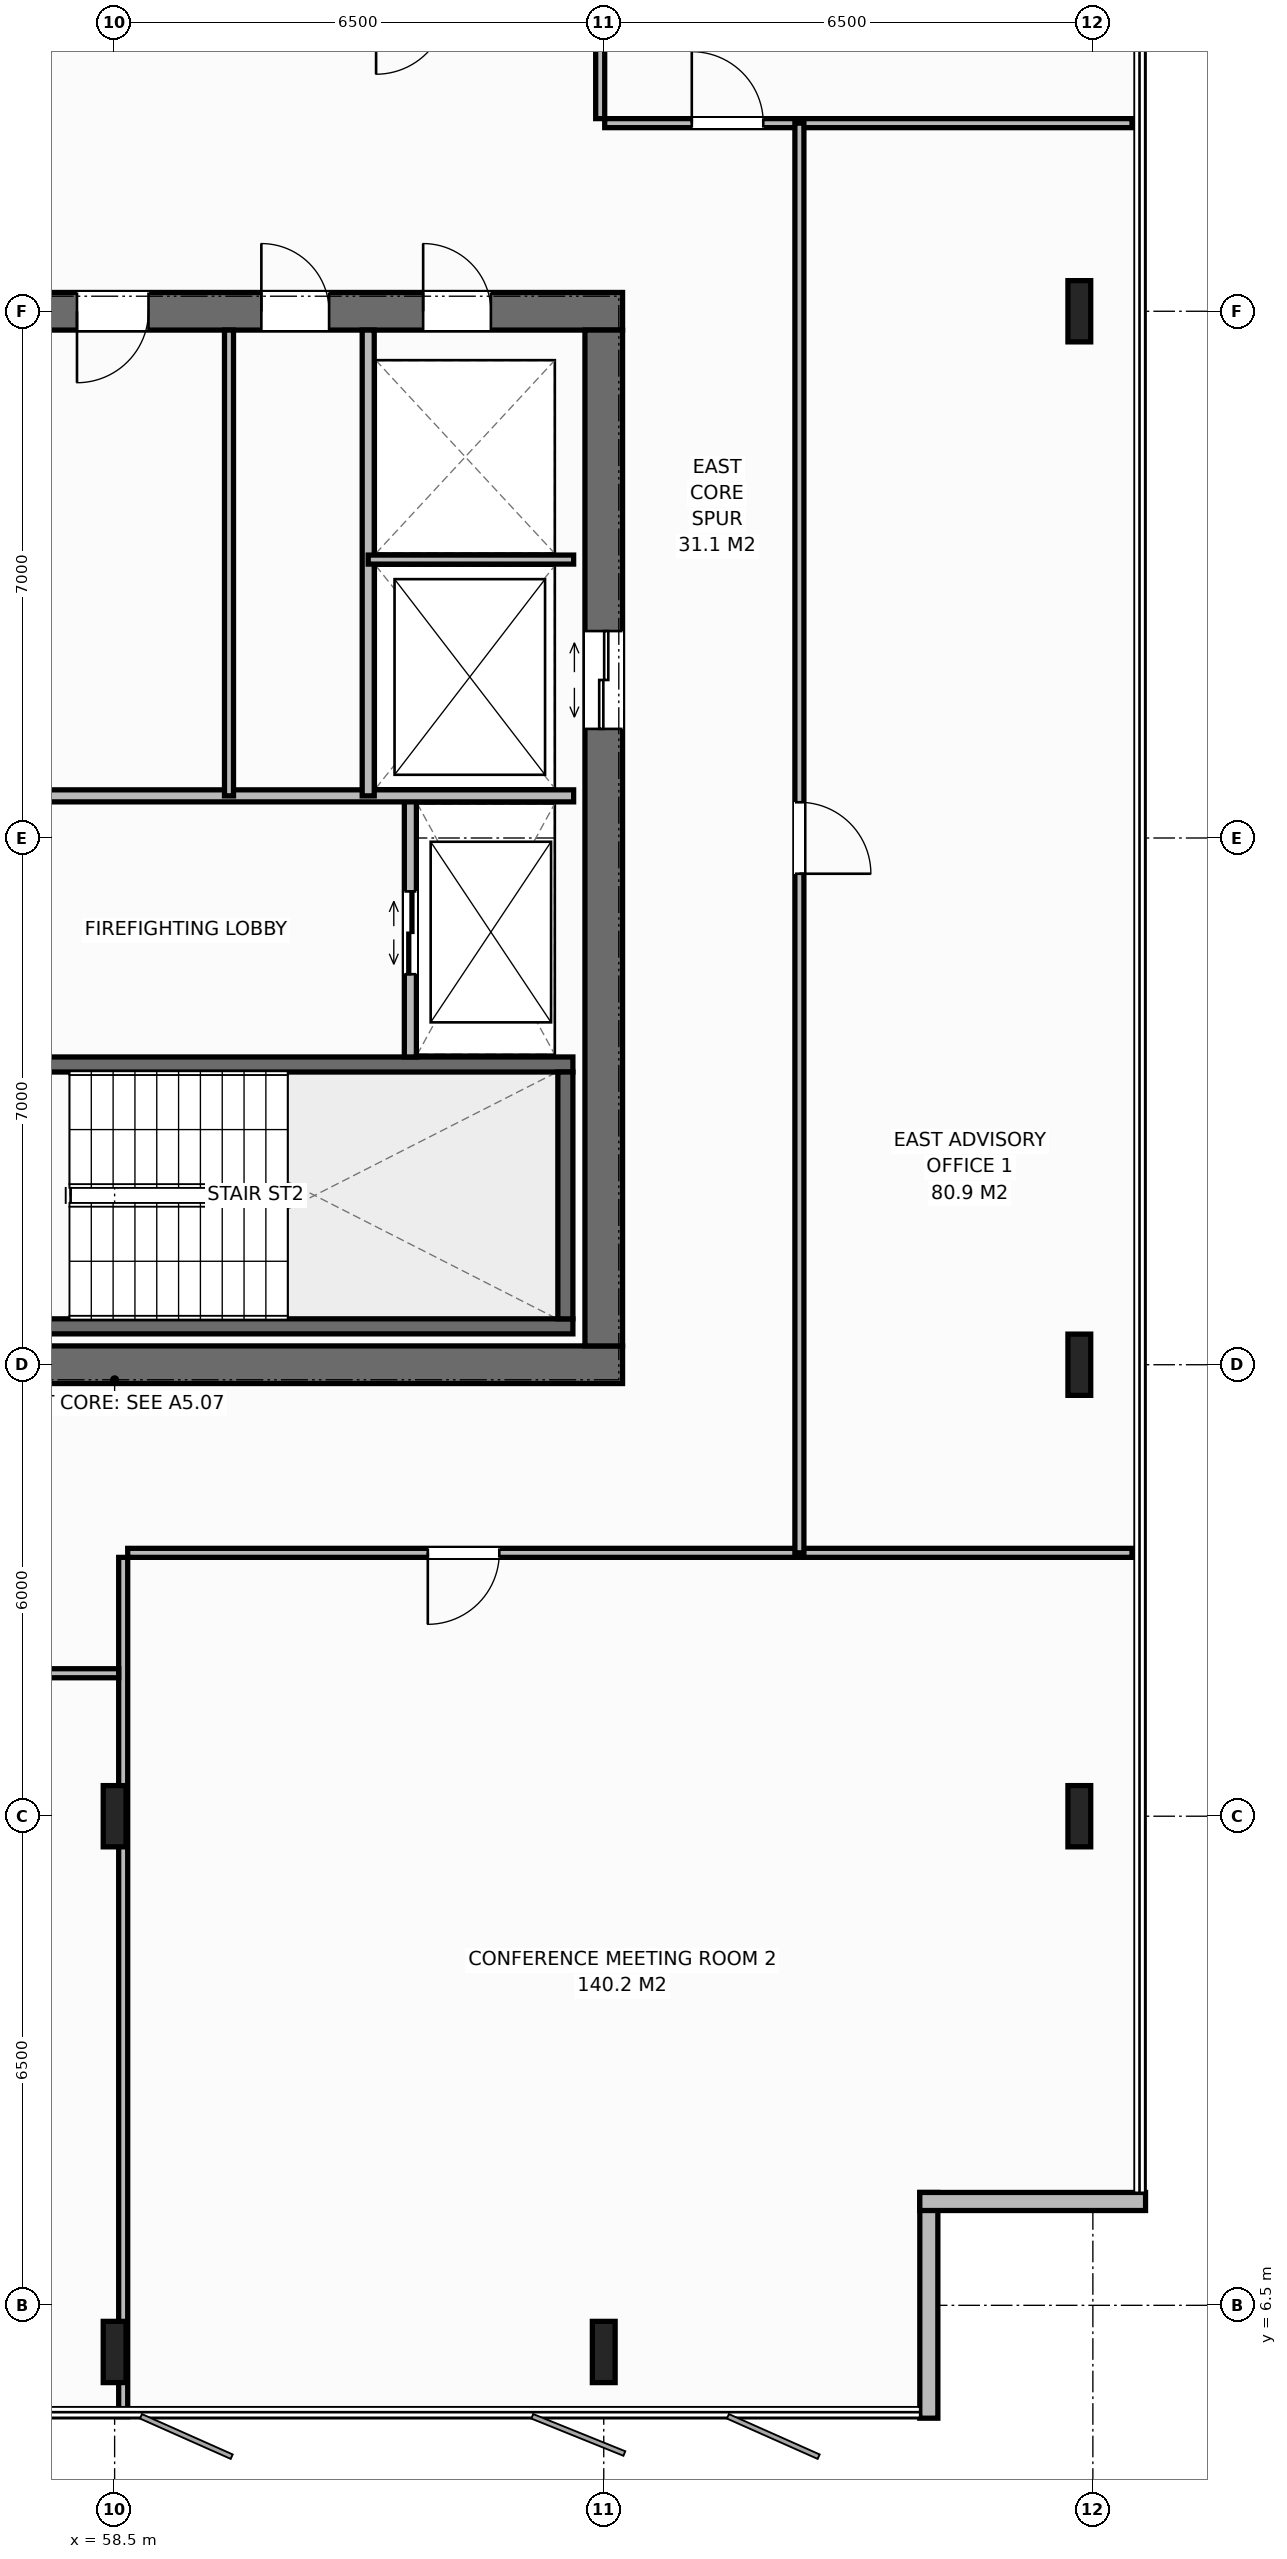
"""IFC4 building model, lengths in metres.
Left out: names, types, materials, properties, quantities, classifications, styles, units other than length and angle.
Written with IfcOpenShell. Run it as: python <this file> out.ifc"""

import sys

from ifc_helpers import new_model, si_unit, direction, frame, frame_2d, origin, origin_2d, place, context, subcontext, project, spatial, rectangle, i_section, extrude, element, fill, save


model = new_model("IFC4")
c1 = context("Model", 3, precision=1e-05, world=origin(), true_north=direction((0.0, 1.0)))
c2 = subcontext(c1, "Body", "Model", "MODEL_VIEW")
j1 = project(units=[si_unit("LENGTHUNIT", "METRE"), si_unit("PLANEANGLEUNIT", "RADIAN")], contexts=[c1])
p1 = place(None, origin())
s1 = spatial("IfcSite", under=j1, at=p1, CompositionType="ELEMENT")
p2 = place(p1, origin())
s2 = spatial("IfcBuilding", under=s1, at=p2, CompositionType="ELEMENT")
p3 = place(p2, frame((0.0, 0.0, 229.0)))
s3 = spatial("IfcBuildingStorey", under=s2, at=p3, CompositionType="ELEMENT", Elevation=229.0)
p4 = place(p3, frame((51.75, 19.0, 0.0), z_axis=(0.0, 0.0, 1.0), x_axis=(1.0, 0.0, 0.0)))
e1 = element("IfcWall", 1, at=p4, inside=s3, PredefinedType="SHEAR", context=c2, shape_type="SweptSolid", body=[
    extrude(rectangle(XDim=13.5, YDim=0.5, at=frame_2d((6.75, 0.0))), origin(), (0.0, 0.0, 1.0), 3.8),
])
p5 = place(p4, frame((2.97, 0.0, 0.0)))
e2 = element("IfcOpeningElement", 2, at=p5, cuts=e1, PredefinedType="OPENING", context=c2, shape_type="SweptSolid", body=[
    extrude(rectangle(XDim=1.4, YDim=2.2, at=frame_2d((0.7, 1.1))), frame((0.0, 0.26, 0.0), z_axis=(0.0, -1.0, 0.0), x_axis=(1.0, 0.0, 0.0)), (0.0, 0.0, 1.0), 0.52),
])
p6 = place(p3, frame((51.75, 33.0, 0.0), z_axis=(0.0, 0.0, 1.0), x_axis=(1.0, 0.0, 0.0)))
e3 = element("IfcWall", 3, at=p6, inside=s3, PredefinedType="SHEAR", context=c2, shape_type="SweptSolid", body=[
    extrude(rectangle(XDim=13.5, YDim=0.5, at=frame_2d((6.75, 0.0))), origin(), (0.0, 0.0, 1.0), 3.8),
])
p7 = place(p6, frame((2.97, 0.0, 0.0)))
e4 = element("IfcOpeningElement", 4, at=p7, cuts=e3, PredefinedType="OPENING", context=c2, shape_type="SweptSolid", body=[
    extrude(rectangle(XDim=1.4, YDim=2.2, at=frame_2d((0.7, 1.1))), frame((0.0, 0.26, 0.0), z_axis=(0.0, -1.0, 0.0), x_axis=(1.0, 0.0, 0.0)), (0.0, 0.0, 1.0), 0.52),
])
p8 = place(p6, frame((10.85, 0.0, 0.0)))
e5 = element("IfcOpeningElement", 5, at=p8, cuts=e3, PredefinedType="OPENING", context=c2, shape_type="SweptSolid", body=[
    extrude(rectangle(XDim=0.9, YDim=2.15, at=frame_2d((0.45, 1.075))), frame((0.0, 0.26, 0.0), z_axis=(0.0, -1.0, 0.0), x_axis=(1.0, 0.0, 0.0)), (0.0, 0.0, 1.0), 0.52),
])
p9 = place(p6, frame((6.25, 0.0, 0.0)))
e6 = element("IfcOpeningElement", 6, at=p9, cuts=e3, PredefinedType="OPENING", context=c2, shape_type="SweptSolid", body=[
    extrude(rectangle(XDim=0.95, YDim=2.15, at=frame_2d((0.475, 1.075))), frame((0.0, 0.26, 0.0), z_axis=(0.0, -1.0, 0.0), x_axis=(1.0, 0.0, 0.0)), (0.0, 0.0, 1.0), 0.52),
])
p10 = place(p6, frame((8.7, 0.0, 0.0)))
e7 = element("IfcOpeningElement", 7, at=p10, cuts=e3, PredefinedType="OPENING", context=c2, shape_type="SweptSolid", body=[
    extrude(rectangle(XDim=0.9, YDim=2.15, at=frame_2d((0.45, 1.075))), frame((0.0, 0.26, 0.0), z_axis=(0.0, -1.0, 0.0), x_axis=(1.0, 0.0, 0.0)), (0.0, 0.0, 1.0), 0.52),
])
p11 = place(p3, frame((65.0, 19.25, 0.0), z_axis=(0.0, 0.0, 1.0), x_axis=(0.0, 1.0, 0.0)))
e8 = element("IfcWall", 8, at=p11, inside=s3, PredefinedType="SHEAR", context=c2, shape_type="SweptSolid", body=[
    extrude(rectangle(XDim=13.5, YDim=0.5, at=frame_2d((6.75, 0.0))), origin(), (0.0, 0.0, 1.0), 3.8),
])
p12 = place(p11, frame((8.2, 0.0, 0.0)))
e9 = element("IfcOpeningElement", 9, at=p12, cuts=e8, PredefinedType="OPENING", context=c2, shape_type="SweptSolid", body=[
    extrude(rectangle(XDim=1.3, YDim=2.2, at=frame_2d((0.65, 1.1))), frame((0.0, 0.26, 0.0), z_axis=(0.0, -1.0, 0.0), x_axis=(1.0, 0.0, 0.0)), (0.0, 0.0, 1.0), 0.52),
])
p13 = place(p3, frame((56.16, 19.51, 0.0), z_axis=(0.0, 0.0, 1.0), x_axis=(1.0, 0.0, 0.0)))
e10 = element("IfcWall", 10, at=p13, inside=s3, PredefinedType="SHEAR", context=c2, shape_type="SweptSolid", body=[
    extrude(rectangle(XDim=8.43, YDim=0.2, at=frame_2d((4.215, 0.0))), origin(), (0.0, 0.0, 1.0), 3.8),
])
p14 = place(p3, frame((56.16, 22.99, 0.0), z_axis=(0.0, 0.0, 1.0), x_axis=(1.0, 0.0, 0.0)))
e11 = element("IfcWall", 11, at=p14, inside=s3, PredefinedType="SHEAR", context=c2, shape_type="SweptSolid", body=[
    extrude(rectangle(XDim=8.43, YDim=0.2, at=frame_2d((4.215, 0.0))), origin(), (0.0, 0.0, 1.0), 3.8),
])
p15 = place(p14, frame((0.45, 0.0, 0.0)))
e12 = element("IfcOpeningElement", 12, at=p15, cuts=e11, PredefinedType="OPENING", context=c2, shape_type="SweptSolid", body=[
    extrude(rectangle(XDim=1.0, YDim=2.15, at=frame_2d((0.5, 1.075))), frame((0.0, 0.11, 0.0), z_axis=(0.0, -1.0, 0.0), x_axis=(1.0, 0.0, 0.0)), (0.0, 0.0, 1.0), 0.22),
])
p16 = place(p3, frame((64.49, 19.61, 0.0), z_axis=(0.0, 0.0, 1.0), x_axis=(0.0, 1.0, 0.0)))
e13 = element("IfcWall", 13, at=p16, inside=s3, PredefinedType="SHEAR", context=c2, shape_type="SweptSolid", body=[
    extrude(rectangle(XDim=3.28, YDim=0.2, at=frame_2d((1.64, 0.0))), origin(), (0.0, 0.0, 1.0), 3.8),
])
for number, where, z_axis, x_axis in (
    (14, (58.5, 13.0, 0.0), (0.0, 0.0, 1.0), (1.0, 0.0, 0.0)),
    (15, (58.5, 5.88, 0.0), (0.0, 0.0, 1.0), (1.0, 0.0, 0.0)),
    (16, (65.0, 5.88, 0.0), (0.0, 0.0, 1.0), (1.0, 0.0, 0.0)),
    (17, (71.32, 13.0, 0.0), (0.0, 0.0, 1.0), (1.0, 0.0, 0.0)),
    (18, (71.32, 19.0, 0.0), (0.0, 0.0, 1.0), (1.0, 0.0, 0.0)),
    (19, (71.32, 33.0, 0.0), (0.0, 0.0, 1.0), (1.0, 0.0, 0.0)),
):
    element("IfcColumn", number, at=place(p3, frame(where, z_axis=z_axis, x_axis=x_axis)), inside=s3, PredefinedType="COLUMN", context=c2, shape_type="SweptSolid", body=[
        extrude(i_section(OverallWidth=0.303, OverallDepth=0.814, WebThickness=0.021, FlangeThickness=0.04, at=origin_2d()), origin(), (0.0, 0.0, 1.0), 3.8),
    ])
for number, where, z_axis, x_axis in (
    (20, (69.32, 8.0, 0.0), (0.0, 0.0, 1.0), (0.0, -1.0, 0.0)),
    (21, (72.2, 7.88, 0.0), (0.0, 0.0, 1.0), (-1.0, 0.0, 0.0)),
):
    element("IfcWall", number, at=place(p3, frame(where, z_axis=z_axis, x_axis=x_axis)), inside=s3, PredefinedType="STANDARD", context=c2, shape_type="SweptSolid", body=[
        extrude(rectangle(XDim=3.0, YDim=0.24, at=frame_2d((1.5, 0.0))), origin(), (0.0, 0.0, 1.0), 3.58),
    ])
p17 = place(p3, frame((62.43, 23.09, 0.0), z_axis=(0.0, 0.0, 1.0), x_axis=(0.0, 1.0, 0.0)))
e22 = element("IfcWall", 22, at=p17, inside=s3, PredefinedType="STANDARD", context=c2, shape_type="SweptSolid", body=[
    extrude(rectangle(XDim=3.47, YDim=0.16, at=frame_2d((1.735, 0.0))), origin(), (0.0, 0.0, 1.0), 3.58),
])
p18 = place(p17, frame((1.1, 0.0, 0.0)))
e23 = element("IfcOpeningElement", 23, at=p18, cuts=e22, PredefinedType="OPENING", context=c2, shape_type="SweptSolid", body=[
    extrude(rectangle(XDim=1.1, YDim=2.2, at=frame_2d((0.55, 1.1))), frame((0.0, 0.09, 0.0), z_axis=(0.0, -1.0, 0.0), x_axis=(1.0, 0.0, 0.0)), (0.0, 0.0, 1.0), 0.18),
])
p19 = place(p3, frame((56.26, 26.56, 0.0), z_axis=(0.0, 0.0, 1.0), x_axis=(1.0, 0.0, 0.0)))
e24 = element("IfcWall", 24, at=p19, inside=s3, PredefinedType="STANDARD", context=c2, shape_type="SweptSolid", body=[
    extrude(rectangle(XDim=8.34, YDim=0.16, at=frame_2d((4.17, 0.0))), origin(), (0.0, 0.0, 1.0), 3.58),
])
p20 = place(p3, frame((61.87, 26.56, 0.0), z_axis=(0.0, 0.0, 1.0), x_axis=(0.0, 1.0, 0.0)))
e25 = element("IfcWall", 25, at=p20, inside=s3, PredefinedType="STANDARD", context=c2, shape_type="SweptSolid", body=[
    extrude(rectangle(XDim=6.19, YDim=0.16, at=frame_2d((3.095, 0.0))), origin(), (0.0, 0.0, 1.0), 3.58),
])
p21 = place(p3, frame((61.87, 29.7, 0.0), z_axis=(0.0, 0.0, 1.0), x_axis=(1.0, 0.0, 0.0)))
e26 = element("IfcWall", 26, at=p21, inside=s3, PredefinedType="PARTITIONING", context=c2, shape_type="SweptSolid", body=[
    extrude(rectangle(XDim=2.73, YDim=0.12, at=frame_2d((1.365, 0.0))), origin(), (0.0, 0.0, 1.0), 3.58),
])
p22 = place(p3, frame((60.02, 26.56, 0.0), z_axis=(0.0, 0.0, 1.0), x_axis=(0.0, 1.0, 0.0)))
e27 = element("IfcWall", 27, at=p22, inside=s3, PredefinedType="PARTITIONING", context=c2, shape_type="SweptSolid", body=[
    extrude(rectangle(XDim=6.19, YDim=0.12, at=frame_2d((3.095, 0.0))), origin(), (0.0, 0.0, 1.0), 3.58),
])
p23 = place(p3, frame((64.953, 35.56, 0.0), z_axis=(0.0, 0.0, 1.0), x_axis=(0.0, 1.0, 0.0)))
e28 = element("IfcWall", 28, at=p23, inside=s3, PredefinedType="PARTITIONING", context=c2, shape_type="SweptSolid", body=[
    extrude(rectangle(XDim=11.42, YDim=0.12, at=frame_2d((5.71, 0.0))), origin(), (0.0, 0.0, 1.0), 2.88),
])
p24 = place(p3, frame((65.013, 35.5, 0.0), z_axis=(0.0, 0.0, 1.0), x_axis=(1.0, 0.0, 0.0)))
e29 = element("IfcWall", 29, at=p24, inside=s3, PredefinedType="PARTITIONING", context=c2, shape_type="SweptSolid", body=[
    extrude(rectangle(XDim=7.007, YDim=0.12, at=frame_2d((3.504, 0.0))), origin(), (0.0, 0.0, 1.0), 3.58),
])
p25 = place(p24, frame((1.157, 0.0, 0.0)))
e30 = element("IfcOpeningElement", 30, at=p25, cuts=e29, PredefinedType="OPENING", context=c2, shape_type="SweptSolid", body=[
    extrude(rectangle(XDim=0.95, YDim=2.15, at=frame_2d((0.475, 1.075))), frame((0.0, 0.07, 0.0), z_axis=(0.0, -1.0, 0.0), x_axis=(1.0, 0.0, 0.0)), (0.0, 0.0, 1.0), 0.14),
])
p26 = place(p3, frame((58.614, 5.02, 0.0), z_axis=(0.0, 0.0, 1.0), x_axis=(0.0, 1.0, 0.0)))
e31 = element("IfcWall", 31, at=p26, inside=s3, PredefinedType="PARTITIONING", context=c2, shape_type="SweptSolid", body=[
    extrude(rectangle(XDim=11.42, YDim=0.12, at=frame_2d((5.71, 0.0))), origin(), (0.0, 0.0, 1.0), 2.88),
])
p27 = place(p3, frame((46.457, 14.9, 0.0), z_axis=(0.0, 0.0, 1.0), x_axis=(1.0, 0.0, 0.0)))
e32 = element("IfcWall", 32, at=p27, inside=s3, PredefinedType="PARTITIONING", context=c2, shape_type="SweptSolid", body=[
    extrude(rectangle(XDim=12.097, YDim=0.12, at=frame_2d((6.049, 0.0))), origin(), (0.0, 0.0, 1.0), 3.58),
])
p28 = place(p27, frame((0.48, 0.0, 0.0)))
e33 = element("IfcOpeningElement", 33, at=p28, cuts=e32, PredefinedType="OPENING", context=c2, shape_type="SweptSolid", body=[
    extrude(rectangle(XDim=0.95, YDim=2.15, at=frame_2d((0.475, 1.075))), frame((0.0, 0.07, 0.0), z_axis=(0.0, -1.0, 0.0), x_axis=(1.0, 0.0, 0.0)), (0.0, 0.0, 1.0), 0.14),
])
p29 = place(p3, frame((58.674, 16.5, 0.0), z_axis=(0.0, 0.0, 1.0), x_axis=(1.0, 0.0, 0.0)))
e34 = element("IfcWall", 34, at=p29, inside=s3, PredefinedType="PARTITIONING", context=c2, shape_type="SweptSolid", body=[
    extrude(rectangle(XDim=13.346, YDim=0.12, at=frame_2d((6.673, 0.0))), origin(), (0.0, 0.0, 1.0), 3.58),
])
p30 = place(p29, frame((3.988, 0.0, 0.0)))
e35 = element("IfcOpeningElement", 35, at=p30, cuts=e34, PredefinedType="OPENING", context=c2, shape_type="SweptSolid", body=[
    extrude(rectangle(XDim=0.95, YDim=2.15, at=frame_2d((0.475, 1.075))), frame((0.0, 0.07, 0.0), z_axis=(0.0, -1.0, 0.0), x_axis=(1.0, 0.0, 0.0)), (0.0, 0.0, 1.0), 0.14),
])
p31 = place(p3, frame((67.6, 16.5, 0.0), z_axis=(0.0, 0.0, 1.0), x_axis=(0.0, 1.0, 0.0)))
e36 = element("IfcWall", 36, at=p31, inside=s3, PredefinedType="PARTITIONING", context=c2, shape_type="SweptSolid", body=[
    extrude(rectangle(XDim=19.0, YDim=0.12, at=frame_2d((9.5, 0.0))), origin(), (0.0, 0.0, 1.0), 3.58),
])
p32 = place(p31, frame((9.025, 0.0, 0.0)))
e37 = element("IfcOpeningElement", 37, at=p32, cuts=e36, PredefinedType="OPENING", context=c2, shape_type="SweptSolid", body=[
    extrude(rectangle(XDim=0.95, YDim=2.15, at=frame_2d((0.475, 1.075))), frame((0.0, 0.07, 0.0), z_axis=(0.0, -1.0, 0.0), x_axis=(1.0, 0.0, 0.0)), (0.0, 0.0, 1.0), 0.14),
])
p33 = place(p18, origin())
e38 = element("IfcDoor", 38, at=p33, inside=s3, OperationType="DOUBLE_DOOR_SLIDING", PredefinedType="DOOR", context=c2, shape_type="SweptSolid", body=[
    extrude(rectangle(XDim=1.1, YDim=2.2, at=frame_2d((0.55, 1.1))), frame((0.0, 0.025, 0.0), z_axis=(0.0, -1.0, 0.0), x_axis=(1.0, 0.0, 0.0)), (0.0, 0.0, 1.0), 0.05),
])
fill(e23, e38)
p34 = place(p12, origin())
e39 = element("IfcDoor", 39, at=p34, inside=s3, OperationType="DOUBLE_DOOR_SLIDING", PredefinedType="DOOR", context=c2, shape_type="SweptSolid", body=[
    extrude(rectangle(XDim=1.3, YDim=2.2, at=frame_2d((0.65, 1.1))), frame((0.0, 0.025, 0.0), z_axis=(0.0, -1.0, 0.0), x_axis=(1.0, 0.0, 0.0)), (0.0, 0.0, 1.0), 0.05),
])
fill(e9, e39)
p35 = place(p8, origin())
e40 = element("IfcDoor", 40, at=p35, inside=s3, OperationType="SINGLE_SWING_LEFT", PredefinedType="DOOR", context=c2, shape_type="SweptSolid", body=[
    extrude(rectangle(XDim=0.9, YDim=2.15, at=frame_2d((0.45, 1.075))), frame((0.0, -0.025, 0.0), z_axis=(0.0, -1.0, 0.0), x_axis=(1.0, 0.0, 0.0)), (0.0, 0.0, 1.0), 0.05),
])
fill(e5, e40)
p36 = place(p9, origin())
e41 = element("IfcDoor", 41, at=p36, inside=s3, OperationType="SINGLE_SWING_RIGHT", PredefinedType="DOOR", context=c2, shape_type="SweptSolid", body=[
    extrude(rectangle(XDim=0.95, YDim=2.15, at=frame_2d((0.475, 1.075))), frame((0.0, -0.025, 0.0), z_axis=(0.0, -1.0, 0.0), x_axis=(1.0, 0.0, 0.0)), (0.0, 0.0, 1.0), 0.05),
])
fill(e6, e41)
p37 = place(p10, origin())
e42 = element("IfcDoor", 42, at=p37, inside=s3, OperationType="SINGLE_SWING_LEFT", PredefinedType="DOOR", context=c2, shape_type="SweptSolid", body=[
    extrude(rectangle(XDim=0.9, YDim=2.15, at=frame_2d((0.45, 1.075))), frame((0.0, -0.025, 0.0), z_axis=(0.0, -1.0, 0.0), x_axis=(1.0, 0.0, 0.0)), (0.0, 0.0, 1.0), 0.05),
])
fill(e7, e42)
p38 = place(p25, origin())
e43 = element("IfcDoor", 43, at=p38, inside=s3, OperationType="SINGLE_SWING_LEFT", PredefinedType="DOOR", context=c2, shape_type="SweptSolid", body=[
    extrude(rectangle(XDim=0.95, YDim=2.15, at=frame_2d((0.475, 1.075))), frame((0.0, 0.025, 0.0), z_axis=(0.0, -1.0, 0.0), x_axis=(1.0, 0.0, 0.0)), (0.0, 0.0, 1.0), 0.05),
])
fill(e30, e43)
p39 = place(p30, origin())
e44 = element("IfcDoor", 44, at=p39, inside=s3, OperationType="SINGLE_SWING_RIGHT", PredefinedType="DOOR", context=c2, shape_type="SweptSolid", body=[
    extrude(rectangle(XDim=0.95, YDim=2.15, at=frame_2d((0.475, 1.075))), frame((0.0, 0.025, 0.0), z_axis=(0.0, -1.0, 0.0), x_axis=(1.0, 0.0, 0.0)), (0.0, 0.0, 1.0), 0.05),
])
fill(e35, e44)
p40 = place(p32, origin())
e45 = element("IfcDoor", 45, at=p40, inside=s3, OperationType="SINGLE_SWING_RIGHT", PredefinedType="DOOR", context=c2, shape_type="SweptSolid", body=[
    extrude(rectangle(XDim=0.95, YDim=2.15, at=frame_2d((0.475, 1.075))), frame((0.0, 0.025, 0.0), z_axis=(0.0, -1.0, 0.0), x_axis=(1.0, 0.0, 0.0)), (0.0, 0.0, 1.0), 0.05),
])
fill(e37, e45)
save(model, sys.argv[1])
